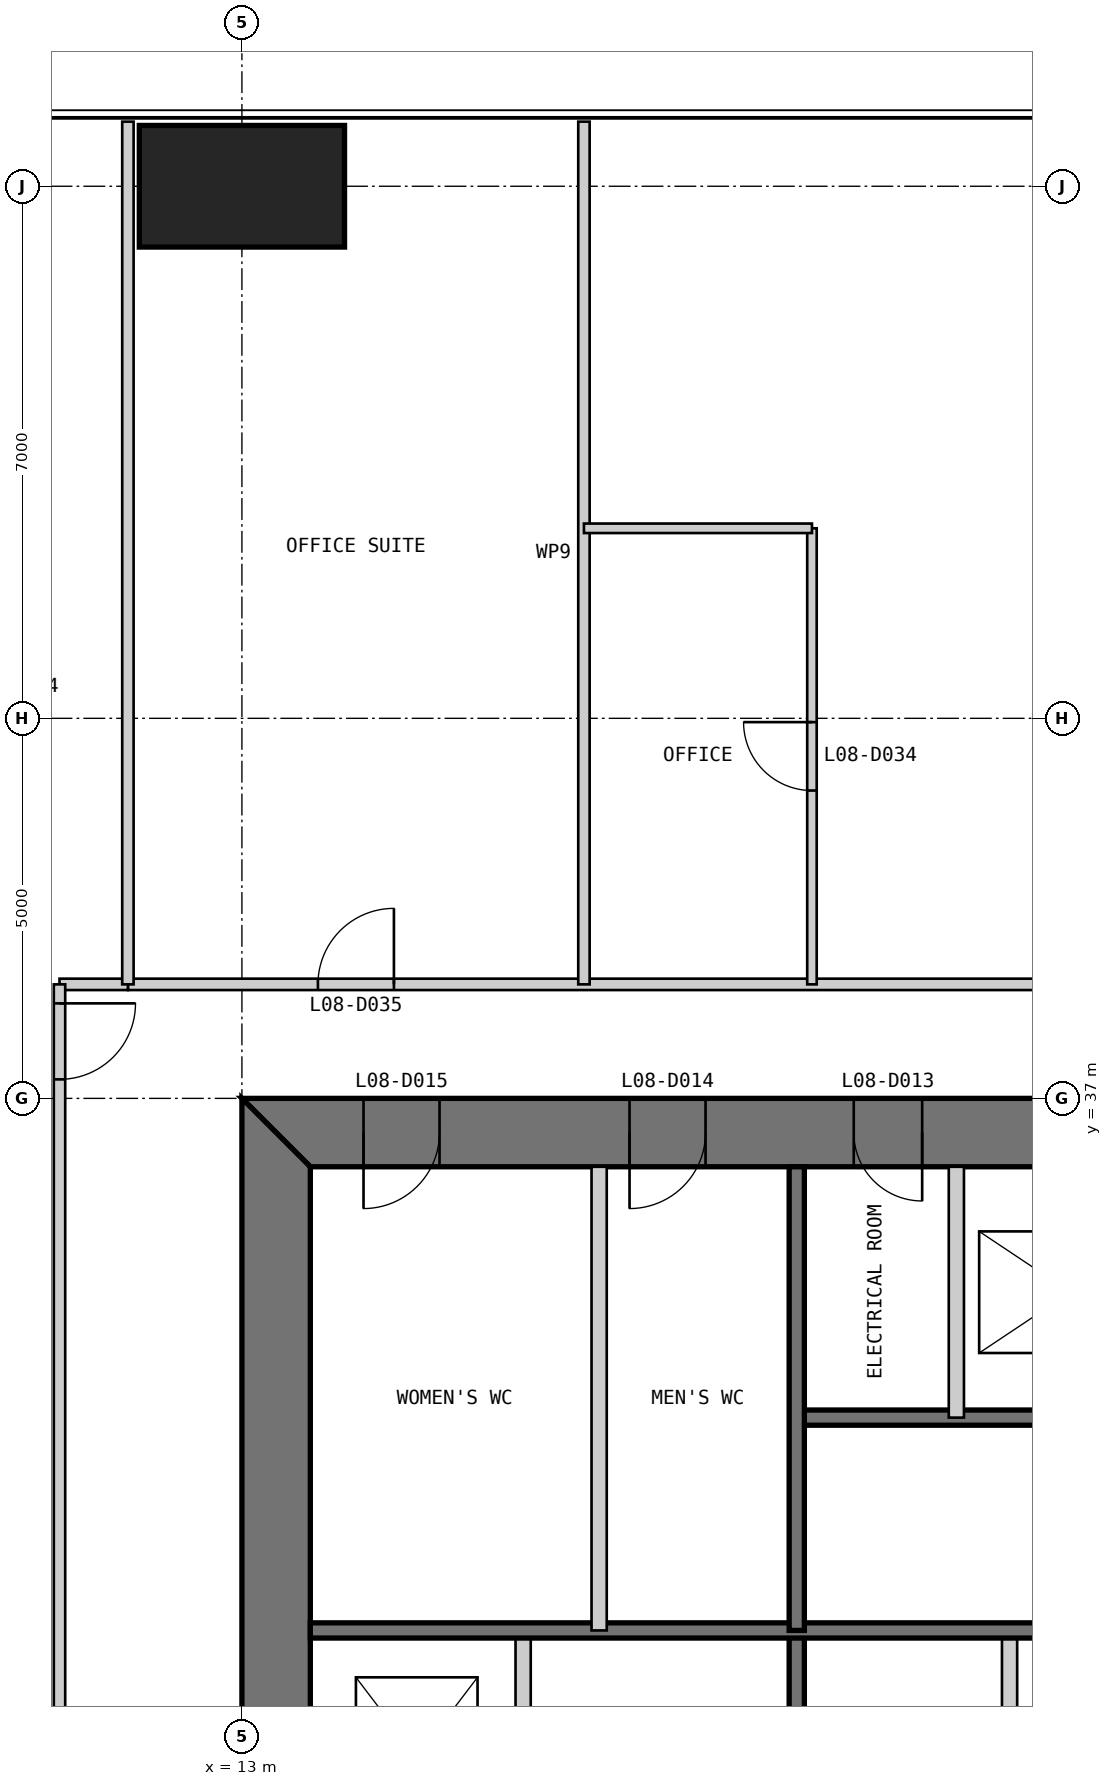
"""IFC4 building model, lengths in metres.
Left out: names, types, materials, properties, quantities, classifications, styles, units other than length and angle.
Written with IfcOpenShell. Run it as: python <this file> out.ifc"""

import sys

from ifc_helpers import new_model, si_unit, direction, frame, frame_2d, origin, origin_2d, place, context, subcontext, project, spatial, polyline, rectangle, outline, extrude, element, fill, save


model = new_model("IFC4")
c1 = context("Model", 3, precision=1e-05, world=origin(), true_north=direction((0.0, 1.0)))
c2 = subcontext(c1, "Body", "Model", "MODEL_VIEW")
j1 = project(units=[si_unit("LENGTHUNIT", "METRE"), si_unit("PLANEANGLEUNIT", "RADIAN")], contexts=[c1])
p1 = place(None, origin())
s1 = spatial("IfcSite", under=j1, at=p1, CompositionType="ELEMENT")
p2 = place(p1, origin())
s2 = spatial("IfcBuilding", under=s1, at=p2, CompositionType="ELEMENT")
p3 = place(p2, frame((0.0, 0.0, 39.0)))
s3 = spatial("IfcBuildingStorey", under=s2, at=p3, CompositionType="ELEMENT", Elevation=39.0)
p4 = place(p3, frame((13.0, 49.0, 0.0), z_axis=(0.0, 0.0, 1.0), x_axis=(1.0, 0.0, 0.0)))
e1 = element("IfcColumn", 1, at=p4, inside=s3, PredefinedType="COLUMN", context=c2, shape_type="SweptSolid", body=[
    extrude(rectangle(XDim=2.7, YDim=1.6, at=origin_2d()), origin(), (0.0, 0.0, 1.0), 4.0),
])
p5 = place(p3, frame((37.0, 36.55, 0.0), z_axis=(0.0, 0.0, 1.0), x_axis=(-1.0, 0.0, 0.0)))
e2 = element("IfcWall", 2, at=p5, inside=s3, PredefinedType="SHEAR", context=c2, shape_type="SweptSolid", body=[
    extrude(outline(polyline([(0.0, -0.45), (24.0, -0.45), (23.1, 0.45), (0.9, 0.45), (0.0, -0.45)])), origin(), (0.0, 0.0, 1.0), 4.0),
])
p6 = place(p5, frame((4.9, 0.0, 0.0)))
e3 = element("IfcOpeningElement", 3, at=p6, cuts=e2, PredefinedType="OPENING", context=c2, shape_type="SweptSolid", body=[
    extrude(rectangle(XDim=1.0, YDim=2.2, at=frame_2d((0.5, 1.1))), frame((0.0, 0.46, 0.0), z_axis=(0.0, -1.0, 0.0), x_axis=(1.0, 0.0, 0.0)), (0.0, 0.0, 1.0), 0.92),
])
p7 = place(p5, frame((8.9, 0.0, 0.0)))
e4 = element("IfcOpeningElement", 4, at=p7, cuts=e2, PredefinedType="OPENING", context=c2, shape_type="SweptSolid", body=[
    extrude(rectangle(XDim=1.1, YDim=2.2, at=frame_2d((0.55, 1.1))), frame((0.0, 0.46, 0.0), z_axis=(0.0, -1.0, 0.0), x_axis=(1.0, 0.0, 0.0)), (0.0, 0.0, 1.0), 0.92),
])
p8 = place(p5, frame((15.05, 0.0, 0.0)))
e5 = element("IfcOpeningElement", 5, at=p8, cuts=e2, PredefinedType="OPENING", context=c2, shape_type="SweptSolid", body=[
    extrude(rectangle(XDim=0.9, YDim=2.2, at=frame_2d((0.45, 1.1))), frame((0.0, 0.46, 0.0), z_axis=(0.0, -1.0, 0.0), x_axis=(1.0, 0.0, 0.0)), (0.0, 0.0, 1.0), 0.92),
])
p9 = place(p5, frame((17.9, 0.0, 0.0)))
e6 = element("IfcOpeningElement", 6, at=p9, cuts=e2, PredefinedType="OPENING", context=c2, shape_type="SweptSolid", body=[
    extrude(rectangle(XDim=1.0, YDim=2.2, at=frame_2d((0.5, 1.1))), frame((0.0, 0.46, 0.0), z_axis=(0.0, -1.0, 0.0), x_axis=(1.0, 0.0, 0.0)), (0.0, 0.0, 1.0), 0.92),
])
p10 = place(p5, frame((21.4, 0.0, 0.0)))
e7 = element("IfcOpeningElement", 7, at=p10, cuts=e2, PredefinedType="OPENING", context=c2, shape_type="SweptSolid", body=[
    extrude(rectangle(XDim=1.0, YDim=2.2, at=frame_2d((0.5, 1.1))), frame((0.0, 0.46, 0.0), z_axis=(0.0, -1.0, 0.0), x_axis=(1.0, 0.0, 0.0)), (0.0, 0.0, 1.0), 0.92),
])
p11 = place(p3, frame((13.45, 36.1, 0.0), z_axis=(0.0, 0.0, 1.0), x_axis=(0.0, -1.0, 0.0)))
e8 = element("IfcWall", 8, at=p11, inside=s3, PredefinedType="SHEAR", context=c2, shape_type="SweptSolid", body=[
    extrude(outline(polyline([(-0.9, -0.45), (23.1, -0.45), (22.2, 0.45), (0.0, 0.45), (-0.9, -0.45)])), origin(), (0.0, 0.0, 1.0), 4.0),
])
p12 = place(p11, frame((20.2, 0.0, 0.0)))
e9 = element("IfcOpeningElement", 9, at=p12, cuts=e8, PredefinedType="OPENING", context=c2, shape_type="SweptSolid", body=[
    extrude(rectangle(XDim=1.0, YDim=2.2, at=frame_2d((0.5, 1.1))), frame((0.0, 0.46, 0.0), z_axis=(0.0, -1.0, 0.0), x_axis=(1.0, 0.0, 0.0)), (0.0, 0.0, 1.0), 0.92),
])
p13 = place(p11, frame((17.25, 0.0, 0.0)))
e10 = element("IfcOpeningElement", 10, at=p13, cuts=e8, PredefinedType="OPENING", context=c2, shape_type="SweptSolid", body=[
    extrude(rectangle(XDim=0.9, YDim=2.2, at=frame_2d((0.45, 1.1))), frame((0.0, 0.46, 0.0), z_axis=(0.0, -1.0, 0.0), x_axis=(1.0, 0.0, 0.0)), (0.0, 0.0, 1.0), 0.92),
])
p14 = place(p3, frame((16.7, 13.9, 0.0), z_axis=(0.0, 0.0, 1.0), x_axis=(0.0, 1.0, 0.0)))
e11 = element("IfcWall", 11, at=p14, inside=s3, PredefinedType="PARTITIONING", context=c2, shape_type="SweptSolid", body=[
    extrude(rectangle(XDim=16.1, YDim=0.2, at=frame_2d((8.05, 0.0))), origin(), (0.0, 0.0, 1.0), 3.8),
])
p15 = place(p14, frame((3.8, 0.0, 0.0)))
e12 = element("IfcOpeningElement", 12, at=p15, cuts=e11, PredefinedType="OPENING", context=c2, shape_type="SweptSolid", body=[
    extrude(rectangle(XDim=0.9, YDim=2.2, at=frame_2d((0.45, 1.1))), frame((0.0, 0.11, 0.0), z_axis=(0.0, -1.0, 0.0), x_axis=(1.0, 0.0, 0.0)), (0.0, 0.0, 1.0), 0.22),
])
p16 = place(p14, frame((7.217, 0.0, 0.0)))
e13 = element("IfcOpeningElement", 13, at=p16, cuts=e11, PredefinedType="OPENING", context=c2, shape_type="SweptSolid", body=[
    extrude(rectangle(XDim=1.1, YDim=2.2, at=frame_2d((0.55, 1.1))), frame((0.0, 0.11, 0.0), z_axis=(0.0, -1.0, 0.0), x_axis=(1.0, 0.0, 0.0)), (0.0, 0.0, 1.0), 0.22),
])
p17 = place(p14, frame((10.55, 0.0, 0.0)))
e14 = element("IfcOpeningElement", 14, at=p17, cuts=e11, PredefinedType="OPENING", context=c2, shape_type="SweptSolid", body=[
    extrude(rectangle(XDim=1.1, YDim=2.2, at=frame_2d((0.55, 1.1))), frame((0.0, 0.11, 0.0), z_axis=(0.0, -1.0, 0.0), x_axis=(1.0, 0.0, 0.0)), (0.0, 0.0, 1.0), 0.22),
])
p18 = place(p14, frame((13.883, 0.0, 0.0)))
e15 = element("IfcOpeningElement", 15, at=p18, cuts=e11, PredefinedType="OPENING", context=c2, shape_type="SweptSolid", body=[
    extrude(rectangle(XDim=1.1, YDim=2.2, at=frame_2d((0.55, 1.1))), frame((0.0, 0.11, 0.0), z_axis=(0.0, -1.0, 0.0), x_axis=(1.0, 0.0, 0.0)), (0.0, 0.0, 1.0), 0.22),
])
p19 = place(p3, frame((20.3, 13.9, 0.0), z_axis=(0.0, 0.0, 1.0), x_axis=(0.0, 1.0, 0.0)))
e16 = element("IfcWall", 16, at=p19, inside=s3, PredefinedType="SOLIDWALL", context=c2, shape_type="SweptSolid", body=[
    extrude(rectangle(XDim=16.1, YDim=0.2, at=frame_2d((8.05, 0.0))), origin(), (0.0, 0.0, 1.0), 3.8),
])
p20 = place(p3, frame((23.1, 20.0, 0.0), z_axis=(0.0, 0.0, 1.0), x_axis=(0.0, 1.0, 0.0)))
e17 = element("IfcWall", 17, at=p20, inside=s3, PredefinedType="PARTITIONING", context=c2, shape_type="SweptSolid", body=[
    extrude(rectangle(XDim=10.0, YDim=0.2, at=frame_2d((5.0, 0.0))), origin(), (0.0, 0.0, 1.0), 3.8),
])
p21 = place(p3, frame((29.7, 32.8, 0.0), z_axis=(0.0, 0.0, 1.0), x_axis=(-1.0, 0.0, 0.0)))
e18 = element("IfcWall", 18, at=p21, inside=s3, PredefinedType="SOLIDWALL", context=c2, shape_type="SweptSolid", body=[
    extrude(rectangle(XDim=9.4, YDim=0.2, at=frame_2d((4.7, 0.0))), origin(), (0.0, 0.0, 1.0), 3.8),
])
p22 = place(p21, frame((0.25, 0.0, 0.0)))
e19 = element("IfcOpeningElement", 19, at=p22, cuts=e18, PredefinedType="OPENING", context=c2, shape_type="SweptSolid", body=[
    extrude(rectangle(XDim=1.0, YDim=2.2, at=frame_2d((0.5, 1.1))), frame((0.0, 0.11, 0.0), z_axis=(0.0, -1.0, 0.0), x_axis=(1.0, 0.0, 0.0)), (0.0, 0.0, 1.0), 0.22),
])
p23 = place(p3, frame((29.7, 30.0, 0.0), z_axis=(0.0, 0.0, 1.0), x_axis=(-1.0, 0.0, 0.0)))
e20 = element("IfcWall", 20, at=p23, inside=s3, PredefinedType="SOLIDWALL", context=c2, shape_type="SweptSolid", body=[
    extrude(rectangle(XDim=15.8, YDim=0.2, at=frame_2d((7.9, 0.0))), origin(), (0.0, 0.0, 1.0), 3.8),
])
p24 = place(p3, frame((22.4, 36.1, 0.0), z_axis=(0.0, 0.0, 1.0), x_axis=(0.0, -1.0, 0.0)))
e21 = element("IfcWall", 21, at=p24, inside=s3, PredefinedType="PARTITIONING", context=c2, shape_type="SweptSolid", body=[
    extrude(rectangle(XDim=3.3, YDim=0.2, at=frame_2d((1.65, 0.0))), origin(), (0.0, 0.0, 1.0), 3.8),
])
p25 = place(p3, frame((20.3, 36.1, 0.0), z_axis=(0.0, 0.0, 1.0), x_axis=(0.0, -1.0, 0.0)))
e22 = element("IfcWall", 22, at=p25, inside=s3, PredefinedType="SOLIDWALL", context=c2, shape_type="SweptSolid", body=[
    extrude(rectangle(XDim=6.1, YDim=0.2, at=frame_2d((3.05, 0.0))), origin(), (0.0, 0.0, 1.0), 3.8),
])
p26 = place(p3, frame((17.7, 36.1, 0.0), z_axis=(0.0, 0.0, 1.0), x_axis=(0.0, -1.0, 0.0)))
e23 = element("IfcWall", 23, at=p26, inside=s3, PredefinedType="PARTITIONING", context=c2, shape_type="SweptSolid", body=[
    extrude(rectangle(XDim=6.1, YDim=0.2, at=frame_2d((3.05, 0.0))), origin(), (0.0, 0.0, 1.0), 3.8),
])
p27 = place(p3, frame((38.5, 38.5, 0.0), z_axis=(0.0, 0.0, 1.0), x_axis=(-1.0, 0.0, 0.0)))
e24 = element("IfcWall", 24, at=p27, inside=s3, PredefinedType="PARTITIONING", context=c2, shape_type="SweptSolid", body=[
    extrude(rectangle(XDim=27.0, YDim=0.15, at=frame_2d((13.5, 0.0))), origin(), (0.0, 0.0, 1.0), 3.85),
])
p28 = place(p27, frame((2.5, 0.0, 0.0)))
e25 = element("IfcOpeningElement", 25, at=p28, cuts=e24, PredefinedType="OPENING", context=c2, shape_type="SweptSolid", body=[
    extrude(rectangle(XDim=1.0, YDim=2.2, at=frame_2d((0.5, 1.1))), frame((0.0, 0.085, 0.0), z_axis=(0.0, -1.0, 0.0), x_axis=(1.0, 0.0, 0.0)), (0.0, 0.0, 1.0), 0.17),
])
p29 = place(p27, frame((13.0, 0.0, 0.0)))
e26 = element("IfcOpeningElement", 26, at=p29, cuts=e24, PredefinedType="OPENING", context=c2, shape_type="SweptSolid", body=[
    extrude(rectangle(XDim=1.0, YDim=2.2, at=frame_2d((0.5, 1.1))), frame((0.0, 0.085, 0.0), z_axis=(0.0, -1.0, 0.0), x_axis=(1.0, 0.0, 0.0)), (0.0, 0.0, 1.0), 0.17),
])
p30 = place(p27, frame((23.5, 0.0, 0.0)))
e27 = element("IfcOpeningElement", 27, at=p30, cuts=e24, PredefinedType="OPENING", context=c2, shape_type="SweptSolid", body=[
    extrude(rectangle(XDim=1.0, YDim=2.2, at=frame_2d((0.5, 1.1))), frame((0.0, 0.085, 0.0), z_axis=(0.0, -1.0, 0.0), x_axis=(1.0, 0.0, 0.0)), (0.0, 0.0, 1.0), 0.17),
])
p31 = place(p3, frame((20.5, 44.5, 0.0), z_axis=(0.0, 0.0, 1.0), x_axis=(0.0, -1.0, 0.0)))
e28 = element("IfcWall", 28, at=p31, inside=s3, PredefinedType="PARTITIONING", context=c2, shape_type="SweptSolid", body=[
    extrude(rectangle(XDim=6.0, YDim=0.125, at=frame_2d((3.0, 0.0))), origin(), (0.0, 0.0, 1.0), 3.85),
])
p32 = place(p31, frame((2.55, 0.0, 0.0)))
e29 = element("IfcOpeningElement", 29, at=p32, cuts=e28, PredefinedType="OPENING", context=c2, shape_type="SweptSolid", body=[
    extrude(rectangle(XDim=0.9, YDim=2.2, at=frame_2d((0.45, 1.1))), frame((0.0, 0.073, 0.0), z_axis=(0.0, -1.0, 0.0), x_axis=(1.0, 0.0, 0.0)), (0.0, 0.0, 1.0), 0.145),
])
p33 = place(p3, frame((17.5, 49.85, 0.0), z_axis=(0.0, 0.0, 1.0), x_axis=(0.0, -1.0, 0.0)))
e30 = element("IfcWall", 30, at=p33, inside=s3, PredefinedType="PARTITIONING", context=c2, shape_type="SweptSolid", body=[
    extrude(rectangle(XDim=11.35, YDim=0.15, at=frame_2d((5.675, 0.0))), origin(), (0.0, 0.0, 1.0), 3.85),
])
p34 = place(p3, frame((20.5, 44.5, 0.0), z_axis=(0.0, 0.0, 1.0), x_axis=(-1.0, 0.0, 0.0)))
e31 = element("IfcWall", 31, at=p34, inside=s3, PredefinedType="PARTITIONING", context=c2, shape_type="SweptSolid", body=[
    extrude(rectangle(XDim=3.0, YDim=0.125, at=frame_2d((1.5, 0.0))), origin(), (0.0, 0.0, 1.0), 3.85),
])
p35 = place(p3, frame((11.5, 38.5, 0.0), z_axis=(0.0, 0.0, 1.0), x_axis=(-1.0, 0.0, 0.0)))
e32 = element("IfcWall", 32, at=p35, inside=s3, PredefinedType="PARTITIONING", context=c2, shape_type="SweptSolid", body=[
    extrude(rectangle(XDim=0.9, YDim=0.15, at=frame_2d((0.45, 0.0))), origin(), (0.0, 0.0, 1.0), 3.85),
])
p36 = place(p3, frame((10.6, 38.5, 0.0), z_axis=(0.0, 0.0, 1.0), x_axis=(0.0, -1.0, 0.0)))
e33 = element("IfcWall", 33, at=p36, inside=s3, PredefinedType="PARTITIONING", context=c2, shape_type="SweptSolid", body=[
    extrude(rectangle(XDim=27.0, YDim=0.15, at=frame_2d((13.5, 0.0))), origin(), (0.0, 0.0, 1.0), 3.85),
])
p37 = place(p36, frame((0.25, 0.0, 0.0)))
e34 = element("IfcOpeningElement", 34, at=p37, cuts=e33, PredefinedType="OPENING", context=c2, shape_type="SweptSolid", body=[
    extrude(rectangle(XDim=1.0, YDim=2.2, at=frame_2d((0.5, 1.1))), frame((0.0, 0.085, 0.0), z_axis=(0.0, -1.0, 0.0), x_axis=(1.0, 0.0, 0.0)), (0.0, 0.0, 1.0), 0.17),
])
p38 = place(p36, frame((22.75, 0.0, 0.0)))
e35 = element("IfcOpeningElement", 35, at=p38, cuts=e33, PredefinedType="OPENING", context=c2, shape_type="SweptSolid", body=[
    extrude(rectangle(XDim=1.0, YDim=2.2, at=frame_2d((0.5, 1.1))), frame((0.0, 0.085, 0.0), z_axis=(0.0, -1.0, 0.0), x_axis=(1.0, 0.0, 0.0)), (0.0, 0.0, 1.0), 0.17),
])
p39 = place(p3, frame((11.5, 49.85, 0.0), z_axis=(0.0, 0.0, 1.0), x_axis=(0.0, -1.0, 0.0)))
e36 = element("IfcWall", 36, at=p39, inside=s3, PredefinedType="PARTITIONING", context=c2, shape_type="SweptSolid", body=[
    extrude(rectangle(XDim=11.35, YDim=0.15, at=frame_2d((5.675, 0.0))), origin(), (0.0, 0.0, 1.0), 3.85),
])
p40 = place(p8, origin())
e37 = element("IfcDoor", 37, at=p40, inside=s3, OperationType="SINGLE_SWING_LEFT", PredefinedType="DOOR", context=c2, shape_type="SweptSolid", body=[
    extrude(rectangle(XDim=0.9, YDim=2.2, at=frame_2d((0.45, 1.1))), frame((0.0, 0.025, 0.0), z_axis=(0.0, -1.0, 0.0), x_axis=(1.0, 0.0, 0.0)), (0.0, 0.0, 1.0), 0.05),
    extrude(outline(polyline([(0.0, 0.0), (0.04, 0.0), (0.04, 2.16), (0.86, 2.16), (0.86, 0.0), (0.9, 0.0), (0.9, 2.2), (0.0, 2.2), (0.0, 0.0)])), frame((0.0, 0.3, 0.0), z_axis=(0.0, -1.0, 0.0), x_axis=(1.0, 0.0, 0.0)), (0.0, 0.0, 1.0), 0.6),
])
fill(e5, e37)
p41 = place(p9, origin())
e38 = element("IfcDoor", 38, at=p41, inside=s3, OperationType="SINGLE_SWING_RIGHT", PredefinedType="DOOR", context=c2, shape_type="SweptSolid", body=[
    extrude(rectangle(XDim=1.0, YDim=2.2, at=frame_2d((0.5, 1.1))), frame((0.0, 0.025, 0.0), z_axis=(0.0, -1.0, 0.0), x_axis=(1.0, 0.0, 0.0)), (0.0, 0.0, 1.0), 0.05),
    extrude(outline(polyline([(0.0, 0.0), (0.04, 0.0), (0.04, 2.16), (0.96, 2.16), (0.96, 0.0), (1.0, 0.0), (1.0, 2.2), (0.0, 2.2), (0.0, 0.0)])), frame((0.0, 0.3, 0.0), z_axis=(0.0, -1.0, 0.0), x_axis=(1.0, 0.0, 0.0)), (0.0, 0.0, 1.0), 0.6),
])
fill(e6, e38)
p42 = place(p10, origin())
e39 = element("IfcDoor", 39, at=p42, inside=s3, OperationType="SINGLE_SWING_RIGHT", PredefinedType="DOOR", context=c2, shape_type="SweptSolid", body=[
    extrude(rectangle(XDim=1.0, YDim=2.2, at=frame_2d((0.5, 1.1))), frame((0.0, 0.025, 0.0), z_axis=(0.0, -1.0, 0.0), x_axis=(1.0, 0.0, 0.0)), (0.0, 0.0, 1.0), 0.05),
    extrude(outline(polyline([(0.0, 0.0), (0.04, 0.0), (0.04, 2.16), (0.96, 2.16), (0.96, 0.0), (1.0, 0.0), (1.0, 2.2), (0.0, 2.2), (0.0, 0.0)])), frame((0.0, 0.3, 0.0), z_axis=(0.0, -1.0, 0.0), x_axis=(1.0, 0.0, 0.0)), (0.0, 0.0, 1.0), 0.6),
])
fill(e7, e39)
p43 = place(p32, frame((0.9, 0.0, 0.0), z_axis=(0.0, 0.0, 1.0), x_axis=(-1.0, 0.0, 0.0)))
e40 = element("IfcDoor", 40, at=p43, inside=s3, OperationType="SINGLE_SWING_RIGHT", PredefinedType="DOOR", context=c2, shape_type="SweptSolid", body=[
    extrude(rectangle(XDim=0.9, YDim=2.2, at=frame_2d((0.45, 1.1))), frame((0.0, 0.025, 0.0), z_axis=(0.0, -1.0, 0.0), x_axis=(1.0, 0.0, 0.0)), (0.0, 0.0, 1.0), 0.05),
])
fill(e29, e40)
p44 = place(p30, frame((1.0, 0.0, 0.0), z_axis=(0.0, 0.0, 1.0), x_axis=(-1.0, 0.0, 0.0)))
e41 = element("IfcDoor", 41, at=p44, inside=s3, OperationType="SINGLE_SWING_RIGHT", PredefinedType="DOOR", context=c2, shape_type="SweptSolid", body=[
    extrude(rectangle(XDim=1.0, YDim=2.2, at=frame_2d((0.5, 1.1))), frame((0.0, 0.025, 0.0), z_axis=(0.0, -1.0, 0.0), x_axis=(1.0, 0.0, 0.0)), (0.0, 0.0, 1.0), 0.05),
])
fill(e27, e41)
p45 = place(p37, origin())
e42 = element("IfcDoor", 42, at=p45, inside=s3, OperationType="SINGLE_SWING_LEFT", PredefinedType="DOOR", context=c2, shape_type="SweptSolid", body=[
    extrude(rectangle(XDim=1.0, YDim=2.2, at=frame_2d((0.5, 1.1))), frame((0.0, 0.025, 0.0), z_axis=(0.0, -1.0, 0.0), x_axis=(1.0, 0.0, 0.0)), (0.0, 0.0, 1.0), 0.05),
])
fill(e34, e42)
save(model, sys.argv[1])
